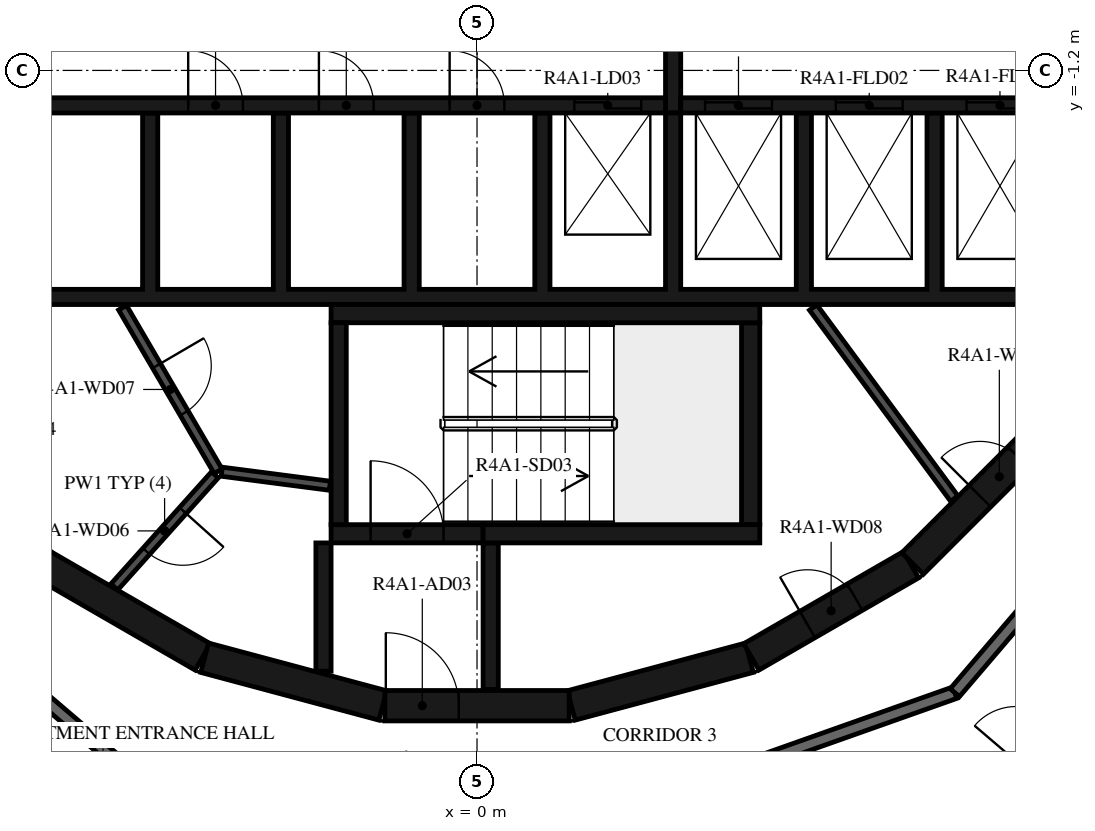
"""IFC4 building model, lengths in metres.
Left out: names, types, materials, properties, quantities, classifications, styles, units other than length and angle.
Written with IfcOpenShell. Run it as: python <this file> out.ifc"""

import sys

from ifc_helpers import new_model, si_unit, direction, frame, frame_2d, origin, place, context, subcontext, project, spatial, polyline, rectangle, outline, extrude, element, fill, save


model = new_model("IFC4")
c1 = context("Model", 3, precision=1e-05, world=origin(), true_north=direction((0.0, 1.0)))
c2 = subcontext(c1, "Body", "Model", "MODEL_VIEW")
j1 = project(units=[si_unit("LENGTHUNIT", "METRE"), si_unit("PLANEANGLEUNIT", "RADIAN")], contexts=[c1])
p1 = place(None, origin())
s1 = spatial("IfcSite", under=j1, at=p1, CompositionType="ELEMENT")
p2 = place(p1, origin())
s2 = spatial("IfcBuilding", under=s1, at=p2, CompositionType="ELEMENT")
p3 = place(p2, frame((0.0, 0.0, 155.2)))
s3 = spatial("IfcBuildingStorey", under=s2, at=p3, CompositionType="ELEMENT", Elevation=155.2)
p4 = place(p3, frame((1.55, -11.643, 0.0), z_axis=(0.0, 0.0, 1.0), x_axis=(0.965948410781, 0.258734743916, 0.0)))
e1 = element("IfcWall", 1, at=p4, inside=s3, PredefinedType="SHEAR", context=c2, shape_type="SweptSolid", body=[
    extrude(rectangle(XDim=3.033, YDim=0.5, at=frame_2d((1.516, 0.0))), origin(), (0.0, 0.0, 1.0), 3.12),
])
p5 = place(p3, frame((4.51, -10.845, 0.0), z_axis=(0.0, 0.0, 1.0), x_axis=(0.865975092491, 0.500087131594, 0.0)))
e2 = element("IfcWall", 2, at=p5, inside=s3, PredefinedType="SHEAR", context=c2, shape_type="SweptSolid", body=[
    extrude(rectangle(XDim=3.033, YDim=0.5, at=frame_2d((1.516, 0.0))), origin(), (0.0, 0.0, 1.0), 3.12),
])
p6 = place(p5, frame((1.066, 0.0, 0.0)))
e3 = element("IfcOpeningElement", 3, at=p6, cuts=e2, PredefinedType="OPENING", context=c2, shape_type="SweptSolid", body=[
    extrude(rectangle(XDim=0.9, YDim=2.1, at=frame_2d((0.45, 1.05))), frame((0.0, 0.26, 0.0), z_axis=(0.0, -1.0, 0.0), x_axis=(1.0, 0.0, 0.0)), (0.0, 0.0, 1.0), 0.52),
])
p7 = place(p3, frame((7.164, -9.308, 0.0), z_axis=(0.0, 0.0, 1.0), x_axis=(0.707106781187, 0.707106781187, 0.0)))
e4 = element("IfcWall", 4, at=p7, inside=s3, PredefinedType="SHEAR", context=c2, shape_type="SweptSolid", body=[
    extrude(rectangle(XDim=3.032, YDim=0.5, at=frame_2d((1.516, 0.0))), origin(), (0.0, 0.0, 1.0), 3.12),
])
p8 = place(p7, frame((1.566, 0.0, 0.0)))
e5 = element("IfcOpeningElement", 5, at=p8, cuts=e4, PredefinedType="OPENING", context=c2, shape_type="SweptSolid", body=[
    extrude(rectangle(XDim=0.9, YDim=2.1, at=frame_2d((0.45, 1.05))), frame((0.0, 0.26, 0.0), z_axis=(0.0, -1.0, 0.0), x_axis=(1.0, 0.0, 0.0)), (0.0, 0.0, 1.0), 0.52),
])
for number, where, z_axis, x_axis in (
    (6, (-7.137, -9.329, 0.0), (0.0, 0.0, 1.0), (0.866, -0.5, 0.0)),
    (7, (-4.479, -10.858, 0.0), (0.0, 0.0, 1.0), (0.966, -0.259, 0.0)),
):
    element("IfcWall", number, at=place(p3, frame(where, z_axis=z_axis, x_axis=x_axis)), inside=s3, PredefinedType="SHEAR", context=c2, shape_type="SweptSolid", body=[
        extrude(rectangle(XDim=3.033, YDim=0.5, at=frame_2d((1.516, 0.0))), origin(), (0.0, 0.0, 1.0), 3.12),
    ])
p9 = place(p3, frame((-1.516, -11.647, 0.0), z_axis=(0.0, 0.0, 1.0), x_axis=(1.0, 0.0, 0.0)))
e8 = element("IfcWall", 8, at=p9, inside=s3, PredefinedType="SHEAR", context=c2, shape_type="SweptSolid", body=[
    extrude(rectangle(XDim=3.033, YDim=0.5, at=frame_2d((1.516, 0.0))), origin(), (0.0, 0.0, 1.0), 3.12),
])
p10 = place(p9, frame((0.016, 0.0, 0.0)))
e9 = element("IfcOpeningElement", 9, at=p10, cuts=e8, PredefinedType="OPENING", context=c2, shape_type="SweptSolid", body=[
    extrude(rectangle(XDim=1.2, YDim=2.1, at=frame_2d((0.6, 1.05))), frame((0.0, 0.26, 0.0), z_axis=(0.0, -1.0, 0.0), x_axis=(1.0, 0.0, 0.0)), (0.0, 0.0, 1.0), 0.52),
])
p11 = place(p3, frame((-2.275, -8.67, 0.0), z_axis=(0.0, 0.0, 1.0), x_axis=(0.0, 1.0, 0.0)))
e10 = element("IfcWall", 10, at=p11, inside=s3, PredefinedType="SHEAR", context=c2, shape_type="SweptSolid", body=[
    extrude(rectangle(XDim=3.32, YDim=0.25, at=frame_2d((1.66, 0.0))), origin(), (0.0, 0.0, 1.0), 3.12),
])
p12 = place(p3, frame((-2.4, -5.2, 0.0), z_axis=(0.0, 0.0, 1.0), x_axis=(1.0, 0.0, 0.0)))
e11 = element("IfcWall", 11, at=p12, inside=s3, PredefinedType="SHEAR", context=c2, shape_type="SweptSolid", body=[
    extrude(rectangle(XDim=7.05, YDim=0.3, at=frame_2d((3.525, 0.0))), origin(), (0.0, 0.0, 1.0), 3.12),
])
p13 = place(p3, frame((4.5, -8.67, 0.0), z_axis=(0.0, 0.0, 1.0), x_axis=(0.0, 1.0, 0.0)))
e12 = element("IfcWall", 12, at=p13, inside=s3, PredefinedType="SHEAR", context=c2, shape_type="SweptSolid", body=[
    extrude(rectangle(XDim=3.32, YDim=0.3, at=frame_2d((1.66, 0.0))), origin(), (0.0, 0.0, 1.0), 3.12),
])
p14 = place(p3, frame((0.1, -8.82, 0.0), z_axis=(0.0, 0.0, 1.0), x_axis=(1.0, 0.0, 0.0)))
e13 = element("IfcWall", 13, at=p14, inside=s3, PredefinedType="SHEAR", context=c2, shape_type="SweptSolid", body=[
    extrude(rectangle(XDim=4.55, YDim=0.3, at=frame_2d((2.275, 0.0))), origin(), (0.0, 0.0, 1.0), 3.12),
])
p15 = place(p3, frame((-2.4, -8.82, 0.0), z_axis=(0.0, 0.0, 1.0), x_axis=(1.0, 0.0, 0.0)))
e14 = element("IfcWall", 14, at=p15, inside=s3, PredefinedType="SHEAR", context=c2, shape_type="SweptSolid", body=[
    extrude(rectangle(XDim=2.5, YDim=0.3, at=frame_2d((1.25, 0.0))), origin(), (0.0, 0.0, 1.0), 3.12),
])
p16 = place(p15, frame((0.65, 0.0, 0.0)))
e15 = element("IfcOpeningElement", 15, at=p16, cuts=e14, PredefinedType="OPENING", context=c2, shape_type="SweptSolid", body=[
    extrude(rectangle(XDim=1.2, YDim=2.1, at=frame_2d((0.6, 1.05))), frame((0.0, 0.16, 0.0), z_axis=(0.0, -1.0, 0.0), x_axis=(1.0, 0.0, 0.0)), (0.0, 0.0, 1.0), 0.32),
])
p17 = place(p3, frame((-2.525, -8.97, 0.0), z_axis=(0.0, 0.0, 1.0), x_axis=(0.0, -1.0, 0.0)))
e16 = element("IfcWall", 16, at=p17, inside=s3, PredefinedType="SHEAR", context=c2, shape_type="SweptSolid", body=[
    extrude(rectangle(XDim=2.11, YDim=0.25, at=frame_2d((1.055, 0.0))), origin(), (0.0, 0.0, 1.0), 3.12),
])
p18 = place(p3, frame((0.225, -8.97, 0.0), z_axis=(0.0, 0.0, 1.0), x_axis=(0.0, -1.0, 0.0)))
e17 = element("IfcWall", 17, at=p18, inside=s3, PredefinedType="SHEAR", context=c2, shape_type="SweptSolid", body=[
    extrude(rectangle(XDim=2.41, YDim=0.25, at=frame_2d((1.205, 0.0))), origin(), (0.0, 0.0, 1.0), 3.12),
])
p19 = place(p3, origin())
e18 = element("IfcWall", 18, at=p19, inside=s3, PredefinedType="SHEAR", context=c2, shape_type="SweptSolid", body=[
    extrude(outline(polyline([(9.8, -5.05), (9.8, -4.8), (9.8, -1.9), (9.55, -1.9), (9.55, -4.8), (7.65, -4.8), (7.65, -1.9), (7.4, -1.9), (7.4, -4.8), (5.5, -4.8), (5.5, -1.9), (5.25, -1.9), (5.25, -4.8), (3.35, -4.8), (3.35, -1.9), (3.1, -1.9), (3.1, -4.8), (1.2, -4.8), (1.2, -1.9), (0.95, -1.9), (0.95, -4.8), (-0.95, -4.8), (-0.95, -1.9), (-1.2, -1.9), (-1.2, -4.8), (-3.1, -4.8), (-3.1, -1.9), (-3.35, -1.9), (-3.35, -4.8), (-5.25, -4.8), (-5.25, -1.9), (-5.5, -1.9), (-5.5, -4.8), (-7.4, -4.8), (-7.4, -1.9), (-7.65, -1.9), (-7.65, -4.8), (-9.55, -4.8), (-9.55, -1.9), (-9.8, -1.9), (-9.8, -4.8), (-9.8, -5.05), (9.8, -5.05)])), origin(), (0.0, 0.0, 1.0), 3.12),
])
p20 = place(p3, frame((-11.28, -1.775, 0.0), z_axis=(0.0, 0.0, 1.0), x_axis=(1.0, 0.0, 0.0)))
e19 = element("IfcWall", 19, at=p20, inside=s3, PredefinedType="SHEAR", context=c2, shape_type="SweptSolid", body=[
    extrude(rectangle(XDim=14.38, YDim=0.25, at=frame_2d((7.19, 0.0))), origin(), (0.0, 0.0, 1.0), 3.12),
])
p21 = place(p20, frame((12.88, 0.0, 0.0)))
e20 = element("IfcOpeningElement", 20, at=p21, cuts=e19, PredefinedType="OPENING", context=c2, shape_type="SweptSolid", body=[
    extrude(rectangle(XDim=1.1, YDim=2.1, at=frame_2d((0.55, 1.05))), frame((0.0, 0.135, 0.0), z_axis=(0.0, -1.0, 0.0), x_axis=(1.0, 0.0, 0.0)), (0.0, 0.0, 1.0), 0.27),
])
p22 = place(p20, frame((6.53, 0.0, 0.0)))
e21 = element("IfcOpeningElement", 21, at=p22, cuts=e19, PredefinedType="OPENING", context=c2, shape_type="SweptSolid", body=[
    extrude(rectangle(XDim=0.9, YDim=2.1, at=frame_2d((0.45, 1.05))), frame((0.0, 0.135, 0.0), z_axis=(0.0, -1.0, 0.0), x_axis=(1.0, 0.0, 0.0)), (0.0, 0.0, 1.0), 0.27),
])
p23 = place(p20, frame((8.68, 0.0, 0.0)))
e22 = element("IfcOpeningElement", 22, at=p23, cuts=e19, PredefinedType="OPENING", context=c2, shape_type="SweptSolid", body=[
    extrude(rectangle(XDim=0.9, YDim=2.1, at=frame_2d((0.45, 1.05))), frame((0.0, 0.135, 0.0), z_axis=(0.0, -1.0, 0.0), x_axis=(1.0, 0.0, 0.0)), (0.0, 0.0, 1.0), 0.27),
])
p24 = place(p20, frame((10.83, 0.0, 0.0)))
e23 = element("IfcOpeningElement", 23, at=p24, cuts=e19, PredefinedType="OPENING", context=c2, shape_type="SweptSolid", body=[
    extrude(rectangle(XDim=0.9, YDim=2.1, at=frame_2d((0.45, 1.05))), frame((0.0, 0.135, 0.0), z_axis=(0.0, -1.0, 0.0), x_axis=(1.0, 0.0, 0.0)), (0.0, 0.0, 1.0), 0.27),
])
p25 = place(p3, frame((3.35, -1.775, 0.0), z_axis=(0.0, 0.0, 1.0), x_axis=(1.0, 0.0, 0.0)))
e24 = element("IfcWall", 24, at=p25, inside=s3, PredefinedType="SHEAR", context=c2, shape_type="SweptSolid", body=[
    extrude(rectangle(XDim=7.93, YDim=0.25, at=frame_2d((3.965, 0.0))), origin(), (0.0, 0.0, 1.0), 3.12),
])
p26 = place(p25, frame((0.4, 0.0, 0.0)))
e25 = element("IfcOpeningElement", 25, at=p26, cuts=e24, PredefinedType="OPENING", context=c2, shape_type="SweptSolid", body=[
    extrude(rectangle(XDim=1.1, YDim=2.4, at=frame_2d((0.55, 1.2))), frame((0.0, 0.135, 0.0), z_axis=(0.0, -1.0, 0.0), x_axis=(1.0, 0.0, 0.0)), (0.0, 0.0, 1.0), 0.27),
])
p27 = place(p25, frame((2.55, 0.0, 0.0)))
e26 = element("IfcOpeningElement", 26, at=p27, cuts=e24, PredefinedType="OPENING", context=c2, shape_type="SweptSolid", body=[
    extrude(rectangle(XDim=1.1, YDim=2.4, at=frame_2d((0.55, 1.2))), frame((0.0, 0.135, 0.0), z_axis=(0.0, -1.0, 0.0), x_axis=(1.0, 0.0, 0.0)), (0.0, 0.0, 1.0), 0.27),
])
p28 = place(p25, frame((4.7, 0.0, 0.0)))
e27 = element("IfcOpeningElement", 27, at=p28, cuts=e24, PredefinedType="OPENING", context=c2, shape_type="SweptSolid", body=[
    extrude(rectangle(XDim=1.1, YDim=2.4, at=frame_2d((0.55, 1.2))), frame((0.0, 0.135, 0.0), z_axis=(0.0, -1.0, 0.0), x_axis=(1.0, 0.0, 0.0)), (0.0, 0.0, 1.0), 0.27),
])
p29 = place(p3, frame((3.225, -1.9, 0.0), z_axis=(0.0, 0.0, 1.0), x_axis=(0.0, 1.0, 0.0)))
e28 = element("IfcWall", 28, at=p29, inside=s3, PredefinedType="SHEAR", context=c2, shape_type="SweptSolid", body=[
    extrude(rectangle(XDim=3.8, YDim=0.25, at=frame_2d((1.9, 0.0))), origin(), (0.0, 0.0, 1.0), 3.12),
])
p30 = place(p3, frame((5.528, -5.098, 0.0), z_axis=(0.0, 0.0, 1.0), x_axis=(0.594034318069, -0.804439698769, 0.0)))
e29 = element("IfcWall", 29, at=p30, inside=s3, PredefinedType="PARTITIONING", context=c2, shape_type="SweptSolid", body=[
    extrude(rectangle(XDim=3.907, YDim=0.15, at=frame_2d((1.953, 0.0))), origin(), (0.0, 0.0, 1.0), 3.12),
])
p31 = place(p3, frame((-5.829, -5.102, 0.0), z_axis=(0.0, 0.0, 1.0), x_axis=(0.504480008384, -0.863423373057, 0.0)))
e30 = element("IfcWall", 30, at=p31, inside=s3, PredefinedType="PARTITIONING", context=c2, shape_type="SweptSolid", body=[
    extrude(rectangle(XDim=3.115, YDim=0.15, at=frame_2d((1.558, 0.0))), origin(), (0.0, 0.0, 1.0), 3.12),
])
p32 = place(p31, frame((1.107, 0.0, 0.0)))
e31 = element("IfcOpeningElement", 31, at=p32, cuts=e30, PredefinedType="OPENING", context=c2, shape_type="SweptSolid", body=[
    extrude(rectangle(XDim=0.9, YDim=2.1, at=frame_2d((0.45, 1.05))), frame((0.0, 0.085, 0.0), z_axis=(0.0, -1.0, 0.0), x_axis=(1.0, 0.0, 0.0)), (0.0, 0.0, 1.0), 0.17),
])
p33 = place(p3, frame((-4.311, -7.851, 0.0), z_axis=(0.0, 0.0, 1.0), x_axis=(-0.667869133096, -0.744278725383, 0.0)))
e32 = element("IfcWall", 32, at=p33, inside=s3, PredefinedType="PARTITIONING", context=c2, shape_type="SweptSolid", body=[
    extrude(rectangle(XDim=2.476, YDim=0.15, at=frame_2d((1.238, 0.0))), origin(), (0.0, 0.0, 1.0), 3.12),
])
p34 = place(p33, frame((0.788, 0.0, 0.0)))
e33 = element("IfcOpeningElement", 33, at=p34, cuts=e32, PredefinedType="OPENING", context=c2, shape_type="SweptSolid", body=[
    extrude(rectangle(XDim=0.9, YDim=2.1, at=frame_2d((0.45, 1.05))), frame((0.0, 0.085, 0.0), z_axis=(0.0, -1.0, 0.0), x_axis=(1.0, 0.0, 0.0)), (0.0, 0.0, 1.0), 0.17),
])
p35 = place(p3, frame((-4.198, -7.799, 0.0), z_axis=(0.0, 0.0, 1.0), x_axis=(0.991686747293, -0.128675542523, 0.0)))
e34 = element("IfcWall", 34, at=p35, inside=s3, PredefinedType="PARTITIONING", context=c2, shape_type="SweptSolid", body=[
    extrude(rectangle(XDim=1.793, YDim=0.15, at=frame_2d((0.896, 0.0))), origin(), (0.0, 0.0, 1.0), 3.12),
])
p36 = place(p3, frame((-11.433, -7.858, 0.0), z_axis=(0.0, 0.0, 1.0), x_axis=(0.760412154545, -0.649440801937, 0.0)))
e35 = element("IfcWall", 35, at=p36, inside=s3, PredefinedType="STANDARD", context=c2, shape_type="SweptSolid", body=[
    extrude(rectangle(XDim=7.181, YDim=0.2, at=frame_2d((3.59, 0.0))), origin(), (0.0, 0.0, 1.0), 3.12),
])
p37 = place(p36, frame((2.39, 0.0, 0.0)))
e36 = element("IfcOpeningElement", 36, at=p37, cuts=e35, PredefinedType="OPENING", context=c2, shape_type="SweptSolid", body=[
    extrude(rectangle(XDim=1.0, YDim=2.1, at=frame_2d((0.5, 1.05))), frame((0.0, 0.11, 0.0), z_axis=(0.0, -1.0, 0.0), x_axis=(1.0, 0.0, 0.0)), (0.0, 0.0, 1.0), 0.22),
])
p38 = place(p3, frame((1.088, -13.83, 0.0), z_axis=(0.0, 0.0, 1.0), x_axis=(0.942648397945, 0.333787354241, 0.0)))
e37 = element("IfcWall", 37, at=p38, inside=s3, PredefinedType="STANDARD", context=c2, shape_type="SweptSolid", body=[
    extrude(rectangle(XDim=7.181, YDim=0.2, at=frame_2d((3.591, 0.0))), origin(), (0.0, 0.0, 1.0), 3.12),
])
p39 = place(p38, frame((0.2, 0.0, 0.0)))
e38 = element("IfcOpeningElement", 38, at=p39, cuts=e37, PredefinedType="OPENING", context=c2, shape_type="SweptSolid", body=[
    extrude(rectangle(XDim=1.0, YDim=2.1, at=frame_2d((0.5, 1.05))), frame((0.0, 0.11, 0.0), z_axis=(0.0, -1.0, 0.0), x_axis=(1.0, 0.0, 0.0)), (0.0, 0.0, 1.0), 0.22),
])
p40 = place(p3, frame((7.858, -11.433, 0.0), z_axis=(0.0, 0.0, 1.0), x_axis=(0.649440801937, 0.760412154545, 0.0)))
e39 = element("IfcWall", 39, at=p40, inside=s3, PredefinedType="STANDARD", context=c2, shape_type="SweptSolid", body=[
    extrude(rectangle(XDim=7.181, YDim=0.2, at=frame_2d((3.59, 0.0))), origin(), (0.0, 0.0, 1.0), 3.12),
])
p41 = place(p3, frame((8.737, -12.713, 0.0), z_axis=(0.0, 0.0, 1.0), x_axis=(0.649430604754, 0.760420863476, 0.0)))
e40 = element("IfcWall", 40, at=p41, inside=s3, PredefinedType="PARTITIONING", context=c2, shape_type="SweptSolid", body=[
    extrude(rectangle(XDim=7.985, YDim=0.12, at=frame_2d((3.992, 0.0))), origin(), (0.0, 0.0, 1.0), 3.12),
])
p42 = place(p41, frame((0.2, 0.0, 0.0)))
e41 = element("IfcOpeningElement", 41, at=p42, cuts=e40, PredefinedType="OPENING", context=c2, shape_type="SweptSolid", body=[
    extrude(rectangle(XDim=0.9, YDim=2.1, at=frame_2d((0.45, 1.05))), frame((0.0, 0.07, 0.0), z_axis=(0.0, -1.0, 0.0), x_axis=(1.0, 0.0, 0.0)), (0.0, 0.0, 1.0), 0.14),
])
p43 = place(p41, frame((6.234, 0.0, 0.0)))
e42 = element("IfcOpeningElement", 42, at=p43, cuts=e40, PredefinedType="OPENING", context=c2, shape_type="SweptSolid", body=[
    extrude(rectangle(XDim=0.8, YDim=2.1, at=frame_2d((0.4, 1.05))), frame((0.0, 0.07, 0.0), z_axis=(0.0, -1.0, 0.0), x_axis=(1.0, 0.0, 0.0)), (0.0, 0.0, 1.0), 0.14),
])
p44 = place(p16, origin())
e43 = element("IfcDoor", 43, at=p44, inside=s3, OperationType="SINGLE_SWING_LEFT", PredefinedType="DOOR", context=c2, shape_type="SweptSolid", body=[
    extrude(rectangle(XDim=1.2, YDim=2.1, at=frame_2d((0.6, 1.05))), frame((0.0, 0.025, 0.0), z_axis=(0.0, -1.0, 0.0), x_axis=(1.0, 0.0, 0.0)), (0.0, 0.0, 1.0), 0.05),
])
fill(e15, e43)
p45 = place(p10, origin())
e44 = element("IfcDoor", 44, at=p45, inside=s3, OperationType="SINGLE_SWING_RIGHT", PredefinedType="DOOR", context=c2, shape_type="SweptSolid", body=[
    extrude(rectangle(XDim=1.2, YDim=2.1, at=frame_2d((0.6, 1.05))), frame((0.0, 0.025, 0.0), z_axis=(0.0, -1.0, 0.0), x_axis=(1.0, 0.0, 0.0)), (0.0, 0.0, 1.0), 0.05),
])
fill(e9, e44)
p46 = place(p21, origin())
e45 = element("IfcDoor", 45, at=p46, inside=s3, OperationType="DOUBLE_DOOR_SLIDING", PredefinedType="DOOR", context=c2, shape_type="SweptSolid", body=[
    extrude(rectangle(XDim=1.1, YDim=2.1, at=frame_2d((0.55, 1.05))), frame((0.0, 0.025, 0.0), z_axis=(0.0, -1.0, 0.0), x_axis=(1.0, 0.0, 0.0)), (0.0, 0.0, 1.0), 0.05),
])
fill(e20, e45)
p47 = place(p26, origin())
e46 = element("IfcDoor", 46, at=p47, inside=s3, OperationType="DOUBLE_DOOR_SLIDING", PredefinedType="DOOR", context=c2, shape_type="SweptSolid", body=[
    extrude(rectangle(XDim=1.1, YDim=2.4, at=frame_2d((0.55, 1.2))), frame((0.0, 0.025, 0.0), z_axis=(0.0, -1.0, 0.0), x_axis=(1.0, 0.0, 0.0)), (0.0, 0.0, 1.0), 0.05),
])
fill(e25, e46)
p48 = place(p27, origin())
e47 = element("IfcDoor", 47, at=p48, inside=s3, OperationType="DOUBLE_DOOR_SLIDING", PredefinedType="DOOR", context=c2, shape_type="SweptSolid", body=[
    extrude(rectangle(XDim=1.1, YDim=2.4, at=frame_2d((0.55, 1.2))), frame((0.0, 0.025, 0.0), z_axis=(0.0, -1.0, 0.0), x_axis=(1.0, 0.0, 0.0)), (0.0, 0.0, 1.0), 0.05),
])
fill(e26, e47)
p49 = place(p28, origin())
e48 = element("IfcDoor", 48, at=p49, inside=s3, OperationType="DOUBLE_DOOR_SLIDING", PredefinedType="DOOR", context=c2, shape_type="SweptSolid", body=[
    extrude(rectangle(XDim=1.1, YDim=2.4, at=frame_2d((0.55, 1.2))), frame((0.0, 0.025, 0.0), z_axis=(0.0, -1.0, 0.0), x_axis=(1.0, 0.0, 0.0)), (0.0, 0.0, 1.0), 0.05),
])
fill(e27, e48)
p50 = place(p22, origin())
e49 = element("IfcDoor", 49, at=p50, inside=s3, OperationType="SINGLE_SWING_LEFT", PredefinedType="DOOR", context=c2, shape_type="SweptSolid", body=[
    extrude(rectangle(XDim=0.9, YDim=2.1, at=frame_2d((0.45, 1.05))), frame((0.0, 0.025, 0.0), z_axis=(0.0, -1.0, 0.0), x_axis=(1.0, 0.0, 0.0)), (0.0, 0.0, 1.0), 0.05),
])
fill(e21, e49)
p51 = place(p23, origin())
e50 = element("IfcDoor", 50, at=p51, inside=s3, OperationType="SINGLE_SWING_RIGHT", PredefinedType="DOOR", context=c2, shape_type="SweptSolid", body=[
    extrude(rectangle(XDim=0.9, YDim=2.1, at=frame_2d((0.45, 1.05))), frame((0.0, 0.025, 0.0), z_axis=(0.0, -1.0, 0.0), x_axis=(1.0, 0.0, 0.0)), (0.0, 0.0, 1.0), 0.05),
])
fill(e22, e50)
p52 = place(p24, origin())
e51 = element("IfcDoor", 51, at=p52, inside=s3, OperationType="SINGLE_SWING_LEFT", PredefinedType="DOOR", context=c2, shape_type="SweptSolid", body=[
    extrude(rectangle(XDim=0.9, YDim=2.1, at=frame_2d((0.45, 1.05))), frame((0.0, 0.025, 0.0), z_axis=(0.0, -1.0, 0.0), x_axis=(1.0, 0.0, 0.0)), (0.0, 0.0, 1.0), 0.05),
])
fill(e23, e51)
p53 = place(p34, origin())
e52 = element("IfcDoor", 52, at=p53, inside=s3, OperationType="SINGLE_SWING_RIGHT", PredefinedType="DOOR", context=c2, shape_type="SweptSolid", body=[
    extrude(rectangle(XDim=0.9, YDim=2.1, at=frame_2d((0.45, 1.05))), frame((0.0, 0.025, 0.0), z_axis=(0.0, -1.0, 0.0), x_axis=(1.0, 0.0, 0.0)), (0.0, 0.0, 1.0), 0.05),
])
fill(e33, e52)
p54 = place(p32, origin())
e53 = element("IfcDoor", 53, at=p54, inside=s3, OperationType="SINGLE_SWING_LEFT", PredefinedType="DOOR", context=c2, shape_type="SweptSolid", body=[
    extrude(rectangle(XDim=0.9, YDim=2.1, at=frame_2d((0.45, 1.05))), frame((0.0, 0.025, 0.0), z_axis=(0.0, -1.0, 0.0), x_axis=(1.0, 0.0, 0.0)), (0.0, 0.0, 1.0), 0.05),
])
fill(e31, e53)
p55 = place(p6, origin())
e54 = element("IfcDoor", 54, at=p55, inside=s3, OperationType="SINGLE_SWING_RIGHT", PredefinedType="DOOR", context=c2, shape_type="SweptSolid", body=[
    extrude(rectangle(XDim=0.9, YDim=2.1, at=frame_2d((0.45, 1.05))), frame((0.0, 0.025, 0.0), z_axis=(0.0, -1.0, 0.0), x_axis=(1.0, 0.0, 0.0)), (0.0, 0.0, 1.0), 0.05),
])
fill(e3, e54)
p56 = place(p8, origin())
e55 = element("IfcDoor", 55, at=p56, inside=s3, OperationType="SINGLE_SWING_LEFT", PredefinedType="DOOR", context=c2, shape_type="SweptSolid", body=[
    extrude(rectangle(XDim=0.9, YDim=2.1, at=frame_2d((0.45, 1.05))), frame((0.0, 0.025, 0.0), z_axis=(0.0, -1.0, 0.0), x_axis=(1.0, 0.0, 0.0)), (0.0, 0.0, 1.0), 0.05),
])
fill(e5, e55)
p57 = place(p42, origin())
e56 = element("IfcDoor", 56, at=p57, inside=s3, OperationType="SINGLE_SWING_RIGHT", PredefinedType="DOOR", context=c2, shape_type="SweptSolid", body=[
    extrude(rectangle(XDim=0.9, YDim=2.1, at=frame_2d((0.45, 1.05))), frame((0.0, 0.025, 0.0), z_axis=(0.0, -1.0, 0.0), x_axis=(1.0, 0.0, 0.0)), (0.0, 0.0, 1.0), 0.05),
])
fill(e41, e56)
save(model, sys.argv[1])
